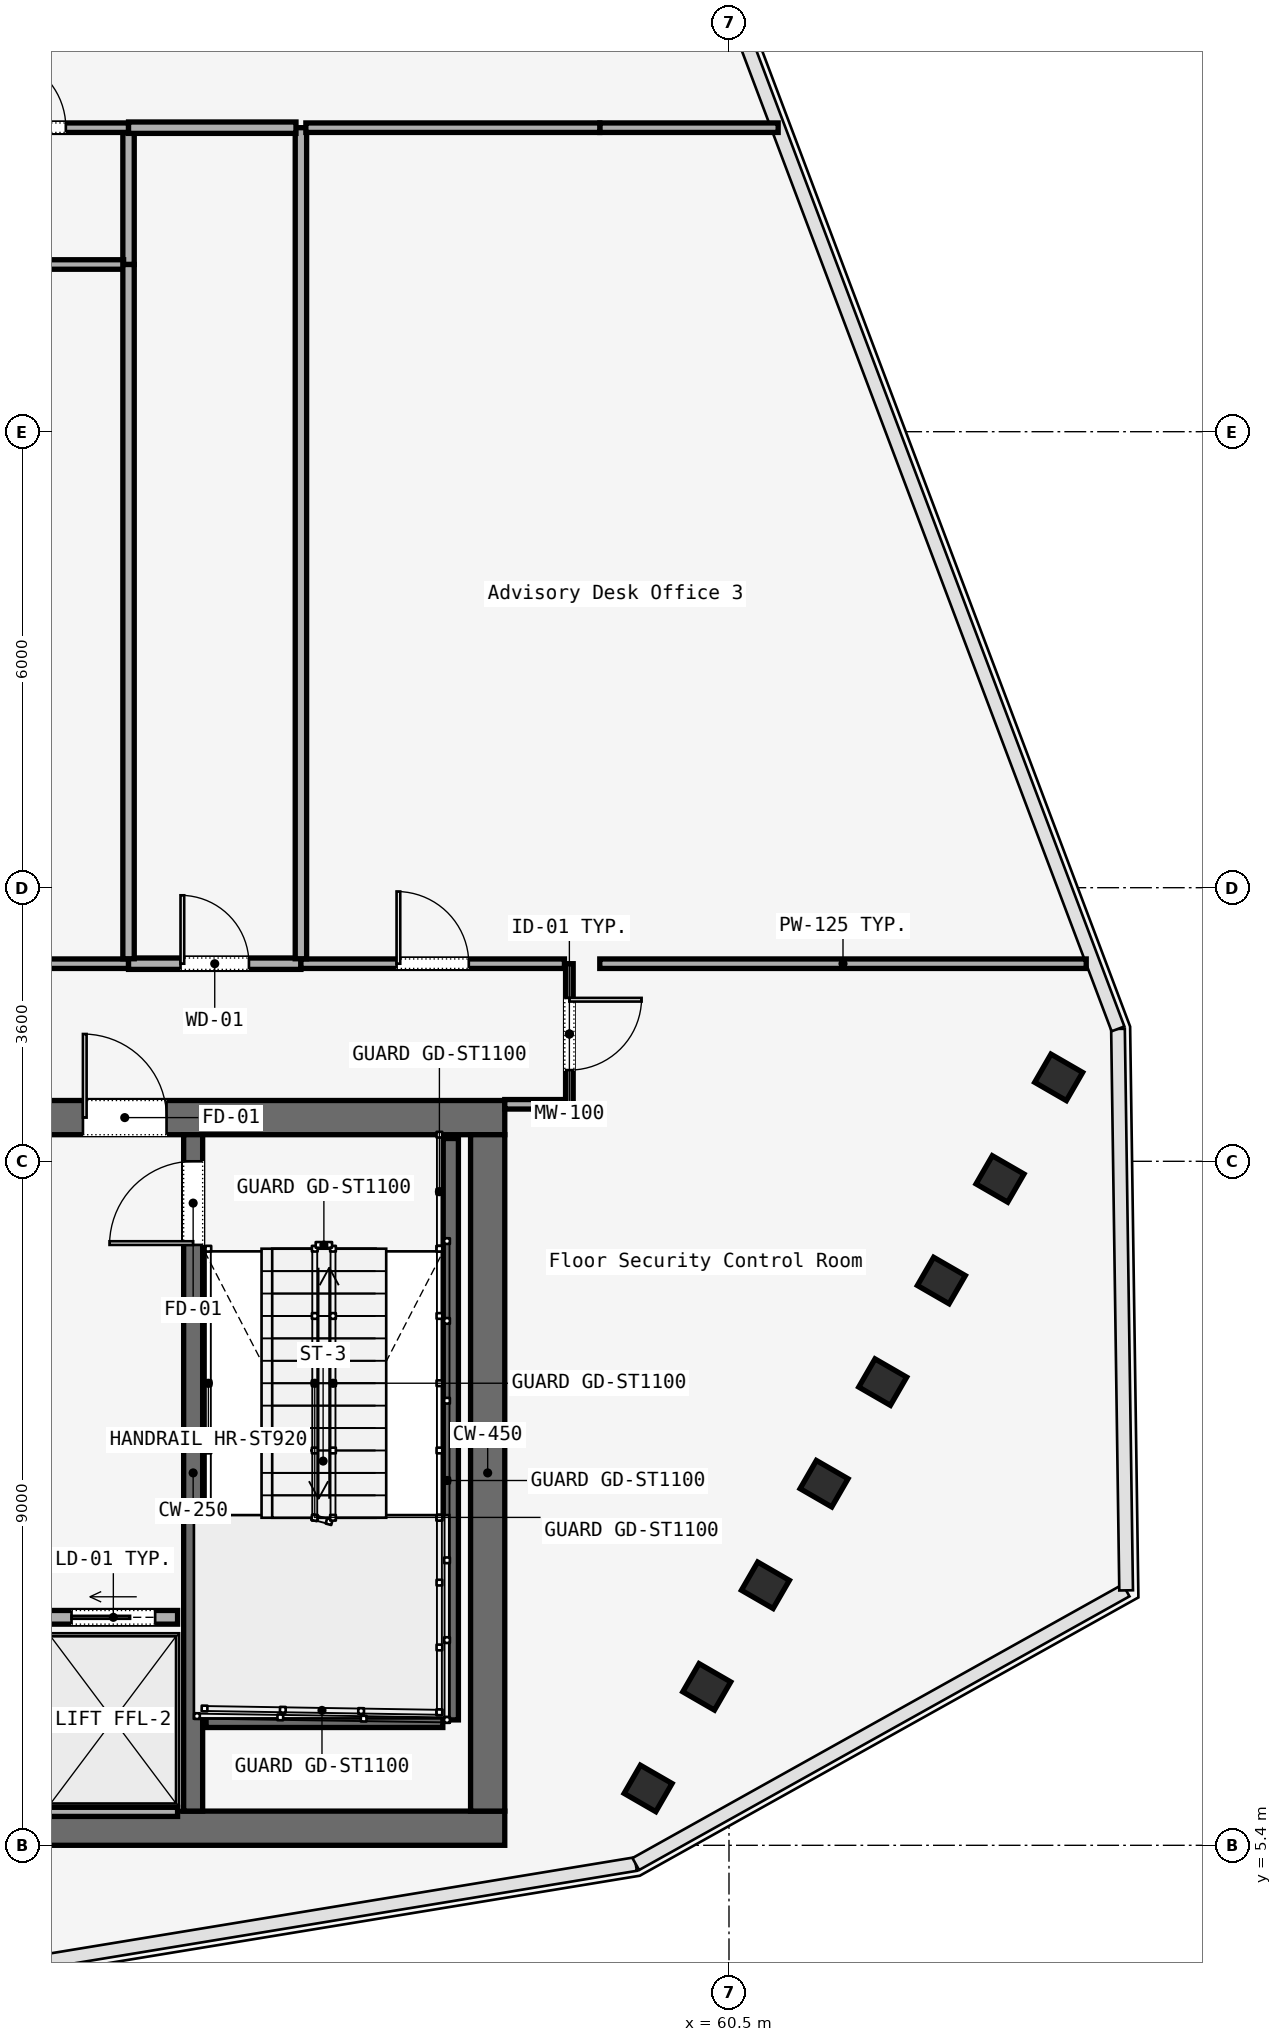
"""IFC4 building model, lengths in metres.
Left out: names, types, materials, properties, quantities, classifications, styles, units other than length and angle.
Written with IfcOpenShell. Run it as: python <this file> out.ifc"""

import sys

from ifc_helpers import new_model, si_unit, direction, frame, frame_2d, origin, origin_2d, place, context, subcontext, project, spatial, rectangle, i_section, extrude, element, fill, save


model = new_model("IFC4")
c1 = context("Model", 3, precision=1e-05, world=origin(), true_north=direction((0.0, 1.0)))
c2 = subcontext(c1, "Body", "Model", "MODEL_VIEW")
j1 = project(units=[si_unit("LENGTHUNIT", "METRE"), si_unit("PLANEANGLEUNIT", "RADIAN")], contexts=[c1])
p1 = place(None, origin())
s1 = spatial("IfcSite", under=j1, at=p1, CompositionType="ELEMENT")
p2 = place(p1, origin())
s2 = spatial("IfcBuilding", under=s1, at=p2, CompositionType="ELEMENT")
p3 = place(p2, frame((0.0, 0.0, 117.4)))
s3 = spatial("IfcBuildingStorey", under=s2, at=p3, CompositionType="ELEMENT", Elevation=117.4)
p4 = place(p3, frame((26.45, 14.975, 0.0), z_axis=(0.0, 0.0, 1.0), x_axis=(1.0, 0.0, 0.0)))
e1 = element("IfcWall", 1, at=p4, inside=s3, PredefinedType="SOLIDWALL", context=c2, shape_type="SweptSolid", body=[
    extrude(rectangle(XDim=31.1, YDim=0.45, at=frame_2d((15.55, 0.0))), origin(), (0.0, 0.0, 1.0), 4.52),
])
p5 = place(p4, frame((1.65, 0.0, 0.0)))
e2 = element("IfcOpeningElement", 2, at=p5, cuts=e1, PredefinedType="OPENING", context=c2, shape_type="SweptSolid", body=[
    extrude(rectangle(XDim=1.1, YDim=2.2, at=frame_2d((0.55, 1.1))), frame((0.0, 0.225, 0.0), z_axis=(0.0, -1.0, 0.0), x_axis=(1.0, 0.0, 0.0)), (0.0, 0.0, 1.0), 0.45),
])
p6 = place(p4, frame((13.65, 0.0, 0.0)))
e3 = element("IfcOpeningElement", 3, at=p6, cuts=e1, PredefinedType="OPENING", context=c2, shape_type="SweptSolid", body=[
    extrude(rectangle(XDim=1.1, YDim=2.2, at=frame_2d((0.55, 1.1))), frame((0.0, 0.225, 0.0), z_axis=(0.0, -1.0, 0.0), x_axis=(1.0, 0.0, 0.0)), (0.0, 0.0, 1.0), 0.45),
])
p7 = place(p4, frame((25.55, 0.0, 0.0)))
e4 = element("IfcOpeningElement", 4, at=p7, cuts=e1, PredefinedType="OPENING", context=c2, shape_type="SweptSolid", body=[
    extrude(rectangle(XDim=1.1, YDim=2.2, at=frame_2d((0.55, 1.1))), frame((0.0, 0.225, 0.0), z_axis=(0.0, -1.0, 0.0), x_axis=(1.0, 0.0, 0.0)), (0.0, 0.0, 1.0), 0.45),
])
p8 = place(p4, frame((10.7, 0.0, 0.0)))
e5 = element("IfcOpeningElement", 5, at=p8, cuts=e1, PredefinedType="OPENING", context=c2, shape_type="SweptSolid", body=[
    extrude(rectangle(XDim=1.4, YDim=2.2, at=frame_2d((0.7, 1.1))), frame((0.0, 0.225, 0.0), z_axis=(0.0, -1.0, 0.0), x_axis=(1.0, 0.0, 0.0)), (0.0, 0.0, 1.0), 0.45),
])
p9 = place(p4, frame((19.35, 0.0, 0.0)))
e6 = element("IfcOpeningElement", 6, at=p9, cuts=e1, PredefinedType="OPENING", context=c2, shape_type="SweptSolid", body=[
    extrude(rectangle(XDim=1.1, YDim=2.2, at=frame_2d((0.55, 1.1))), frame((0.0, 0.225, 0.0), z_axis=(0.0, -1.0, 0.0), x_axis=(1.0, 0.0, 0.0)), (0.0, 0.0, 1.0), 0.45),
])
p10 = place(p4, frame((21.4, 0.0, 0.0)))
e7 = element("IfcOpeningElement", 7, at=p10, cuts=e1, PredefinedType="OPENING", context=c2, shape_type="SweptSolid", body=[
    extrude(rectangle(XDim=0.9, YDim=2.1, at=frame_2d((0.45, 1.05))), frame((0.0, 0.225, 0.0), z_axis=(0.0, -1.0, 0.0), x_axis=(1.0, 0.0, 0.0)), (0.0, 0.0, 1.0), 0.45),
])
p11 = place(p4, frame((23.35, 0.0, 0.0)))
e8 = element("IfcOpeningElement", 8, at=p11, cuts=e1, PredefinedType="OPENING", context=c2, shape_type="SweptSolid", body=[
    extrude(rectangle(XDim=1.3, YDim=2.3, at=frame_2d((0.65, 1.15))), frame((0.0, 0.225, 0.0), z_axis=(0.0, -1.0, 0.0), x_axis=(1.0, 0.0, 0.0)), (0.0, 0.0, 1.0), 0.45),
])
p12 = place(p3, frame((26.45, 5.625, 0.0), z_axis=(0.0, 0.0, 1.0), x_axis=(1.0, 0.0, 0.0)))
e9 = element("IfcWall", 9, at=p12, inside=s3, PredefinedType="SOLIDWALL", context=c2, shape_type="SweptSolid", body=[
    extrude(rectangle(XDim=31.1, YDim=0.45, at=frame_2d((15.55, 0.0))), origin(), (0.0, 0.0, 1.0), 4.52),
])
p13 = place(p3, frame((57.325, 5.85, 0.0), z_axis=(0.0, 0.0, 1.0), x_axis=(0.0, 1.0, 0.0)))
e10 = element("IfcWall", 10, at=p13, inside=s3, PredefinedType="SOLIDWALL", context=c2, shape_type="SweptSolid", body=[
    extrude(rectangle(XDim=8.9, YDim=0.45, at=frame_2d((4.45, 0.0))), origin(), (0.0, 0.0, 1.0), 4.52),
])
p14 = place(p3, frame((53.45, 5.85, 0.0), z_axis=(0.0, 0.0, 1.0), x_axis=(0.0, 1.0, 0.0)))
e11 = element("IfcWall", 11, at=p14, inside=s3, PredefinedType="SOLIDWALL", context=c2, shape_type="SweptSolid", body=[
    extrude(rectangle(XDim=8.9, YDim=0.25, at=frame_2d((4.45, 0.0))), origin(), (0.0, 0.0, 1.0), 4.52),
])
p15 = place(p14, frame((7.45, 0.0, 0.0)))
e12 = element("IfcOpeningElement", 12, at=p15, cuts=e11, PredefinedType="OPENING", context=c2, shape_type="SweptSolid", body=[
    extrude(rectangle(XDim=1.1, YDim=2.2, at=frame_2d((0.55, 1.1))), frame((0.0, 0.125, 0.0), z_axis=(0.0, -1.0, 0.0), x_axis=(1.0, 0.0, 0.0)), (0.0, 0.0, 1.0), 0.25),
])
for number, where, z_axis, x_axis in (
    (13, (59.436, 6.148, 0.0), (0.0, 0.0, 1.0), (0.5, 0.866, 0.0)),
    (14, (60.208, 7.485, 0.0), (0.0, 0.0, 1.0), (0.5, 0.866, 0.0)),
    (15, (60.979, 8.821, 0.0), (0.0, 0.0, 1.0), (0.5, 0.866, 0.0)),
    (16, (61.751, 10.158, 0.0), (0.0, 0.0, 1.0), (0.5, 0.866, 0.0)),
    (17, (62.522, 11.495, 0.0), (0.0, 0.0, 1.0), (0.5, 0.866, 0.0)),
    (18, (63.294, 12.831, 0.0), (0.0, 0.0, 1.0), (0.5, 0.866, 0.0)),
    (19, (64.066, 14.168, 0.0), (0.0, 0.0, 1.0), (0.5, 0.866, 0.0)),
    (20, (64.837, 15.504, 0.0), (0.0, 0.0, 1.0), (0.5, 0.866, 0.0)),
):
    element("IfcColumn", number, at=place(p3, frame(where, z_axis=z_axis, x_axis=x_axis)), inside=s3, PredefinedType="COLUMN", context=c2, shape_type="SweptSolid", body=[
        extrude(i_section(OverallWidth=0.428, OverallDepth=0.481, WebThickness=0.051, FlangeThickness=0.065, FilletRadius=0.015, at=origin_2d()), origin(), (0.0, 0.0, 1.0), 4.52),
    ])
p16 = place(p3, frame((56.84, 14.7, 0.0), z_axis=(0.0, 0.0, 1.0), x_axis=(0.0, -1.0, 0.0)))
e21 = element("IfcWall", 21, at=p16, inside=s3, PredefinedType="SOLIDWALL", context=c2, shape_type="SweptSolid", body=[
    extrude(rectangle(XDim=7.65, YDim=0.2, at=frame_2d((3.825, 0.0))), origin(), (0.0, 0.0, 1.0), 4.8),
])
p17 = place(p3, frame((53.62, 7.05, 0.0), z_axis=(0.0, 0.0, 1.0), x_axis=(1.0, 0.0, 0.0)))
e22 = element("IfcWall", 22, at=p17, inside=s3, PredefinedType="SOLIDWALL", context=c2, shape_type="SweptSolid", body=[
    extrude(rectangle(XDim=3.115, YDim=0.2, at=frame_2d((1.558, 0.0))), origin(), (0.0, 0.0, 1.0), 4.8),
])
p18 = place(p3, frame((51.555, 8.4, 0.0), z_axis=(0.0, 0.0, 1.0), x_axis=(1.0, 0.0, 0.0)))
e23 = element("IfcWall", 23, at=p18, inside=s3, PredefinedType="SOLIDWALL", context=c2, shape_type="SweptSolid", body=[
    extrude(rectangle(XDim=1.69, YDim=0.18, at=frame_2d((0.845, 0.0))), origin(), (0.0, 0.0, 1.0), 3.39),
])
p19 = place(p18, frame((0.295, 0.0, 0.0)))
e24 = element("IfcOpeningElement", 24, at=p19, cuts=e23, PredefinedType="OPENING", context=c2, shape_type="SweptSolid", body=[
    extrude(rectangle(XDim=1.1, YDim=2.2, at=frame_2d((0.55, 1.1))), frame((0.0, 0.09, 0.0), z_axis=(0.0, -1.0, 0.0), x_axis=(1.0, 0.0, 0.0)), (0.0, 0.0, 1.0), 0.18),
])
p20 = place(p3, frame((51.555, 5.84, 0.0), z_axis=(0.0, 0.0, 1.0), x_axis=(1.0, 0.0, 0.0)))
e25 = element("IfcWall", 25, at=p20, inside=s3, PredefinedType="SOLIDWALL", context=c2, shape_type="SweptSolid", body=[
    extrude(rectangle(XDim=1.69, YDim=0.12, at=frame_2d((0.845, 0.0))), origin(), (0.0, 0.0, 1.0), 3.39),
])
p21 = place(p3, frame((58.4, 17.0, 0.0), z_axis=(0.0, 0.0, 1.0), x_axis=(0.0, -1.0, 0.0)))
e26 = element("IfcWall", 26, at=p21, inside=s3, PredefinedType="MOVABLE", context=c2, shape_type="SweptSolid", body=[
    extrude(rectangle(XDim=1.85, YDim=0.1, at=frame_2d((0.925, 0.0))), origin(), (0.0, 0.0, 1.0), 3.39),
])
p22 = place(p21, frame((0.45, 0.0, 0.0)))
e27 = element("IfcOpeningElement", 27, at=p22, cuts=e26, PredefinedType="OPENING", context=c2, shape_type="SweptSolid", body=[
    extrude(rectangle(XDim=0.95, YDim=2.2, at=frame_2d((0.475, 1.1))), frame((0.0, 0.05, 0.0), z_axis=(0.0, -1.0, 0.0), x_axis=(1.0, 0.0, 0.0)), (0.0, 0.0, 1.0), 0.1),
])
p23 = place(p3, frame((58.335, 15.15, 0.0), z_axis=(0.0, 0.0, 1.0), x_axis=(-1.0, 0.0, 0.0)))
e28 = element("IfcWall", 28, at=p23, inside=s3, PredefinedType="PARTITIONING", context=c2, shape_type="SweptSolid", body=[
    extrude(rectangle(XDim=0.785, YDim=0.125, at=frame_2d((0.393, 0.0))), origin(), (0.0, 0.0, 1.0), 3.39),
])
p24 = place(p3, frame((50.0, 28.0, 0.0), z_axis=(0.0, 0.0, 1.0), x_axis=(1.0, 0.0, 0.0)))
e29 = element("IfcWall", 29, at=p24, inside=s3, PredefinedType="PARTITIONING", context=c2, shape_type="SweptSolid", body=[
    extrude(rectangle(XDim=2.6, YDim=0.125, at=frame_2d((1.3, 0.0))), origin(), (0.0, 0.0, 1.0), 3.39),
])
p25 = place(p24, frame((0.825, 0.0, 0.0)))
e30 = element("IfcOpeningElement", 30, at=p25, cuts=e29, PredefinedType="OPENING", context=c2, shape_type="SweptSolid", body=[
    extrude(rectangle(XDim=0.95, YDim=2.2, at=frame_2d((0.475, 1.1))), frame((0.0, 0.062, 0.0), z_axis=(0.0, -1.0, 0.0), x_axis=(1.0, 0.0, 0.0)), (0.0, 0.0, 1.0), 0.125),
])
p26 = place(p3, frame((52.6, 27.935, 0.0), z_axis=(0.0, 0.0, 1.0), x_axis=(0.0, -1.0, 0.0)))
e31 = element("IfcWall", 31, at=p26, inside=s3, PredefinedType="PARTITIONING", context=c2, shape_type="SweptSolid", body=[
    extrude(rectangle(XDim=1.735, YDim=0.15, at=frame_2d((0.868, 0.0))), origin(), (0.0, 0.0, 1.0), 3.39),
])
p27 = place(p3, frame((52.535, 26.2, 0.0), z_axis=(0.0, 0.0, 1.0), x_axis=(-1.0, 0.0, 0.0)))
e32 = element("IfcWall", 32, at=p27, inside=s3, PredefinedType="PARTITIONING", context=c2, shape_type="SweptSolid", body=[
    extrude(rectangle(XDim=11.999, YDim=0.125, at=frame_2d((6.0, 0.0))), origin(), (0.0, 0.0, 1.0), 3.39),
])
p28 = place(p3, frame((40.536, 17.0, 0.0), z_axis=(0.0, 0.0, 1.0), x_axis=(1.0, 0.0, 0.0)))
e33 = element("IfcWall", 33, at=p28, inside=s3, PredefinedType="PARTITIONING", context=c2, shape_type="SweptSolid", body=[
    extrude(rectangle(XDim=12.064, YDim=0.125, at=frame_2d((6.032, 0.0))), origin(), (0.0, 0.0, 1.0), 3.39),
])
p29 = place(p28, frame((5.557, 0.0, 0.0)))
e34 = element("IfcOpeningElement", 34, at=p29, cuts=e33, PredefinedType="OPENING", context=c2, shape_type="SweptSolid", body=[
    extrude(rectangle(XDim=0.95, YDim=2.2, at=frame_2d((0.475, 1.1))), frame((0.0, 0.062, 0.0), z_axis=(0.0, -1.0, 0.0), x_axis=(1.0, 0.0, 0.0)), (0.0, 0.0, 1.0), 0.125),
])
p30 = place(p3, frame((52.6, 17.0, 0.0), z_axis=(0.0, 0.0, 1.0), x_axis=(1.0, 0.0, 0.0)))
e35 = element("IfcWall", 35, at=p30, inside=s3, PredefinedType="PARTITIONING", context=c2, shape_type="SweptSolid", body=[
    extrude(rectangle(XDim=2.268, YDim=0.15, at=frame_2d((1.134, 0.0))), origin(), (0.0, 0.0, 1.0), 3.39),
])
p31 = place(p30, frame((0.684, 0.0, 0.0)))
e36 = element("IfcOpeningElement", 36, at=p31, cuts=e35, PredefinedType="OPENING", context=c2, shape_type="SweptSolid", body=[
    extrude(rectangle(XDim=0.9, YDim=2.15, at=frame_2d((0.45, 1.075))), frame((0.0, 0.075, 0.0), z_axis=(0.0, -1.0, 0.0), x_axis=(1.0, 0.0, 0.0)), (0.0, 0.0, 1.0), 0.15),
])
p32 = place(p3, frame((54.868, 17.0, 0.0), z_axis=(0.0, 0.0, 1.0), x_axis=(1.0, 0.0, 0.0)))
e37 = element("IfcWall", 37, at=p32, inside=s3, PredefinedType="PARTITIONING", context=c2, shape_type="SweptSolid", body=[
    extrude(rectangle(XDim=3.467, YDim=0.125, at=frame_2d((1.733, 0.0))), origin(), (0.0, 0.0, 1.0), 3.39),
])
p33 = place(p32, frame((1.259, 0.0, 0.0)))
e38 = element("IfcOpeningElement", 38, at=p33, cuts=e37, PredefinedType="OPENING", context=c2, shape_type="SweptSolid", body=[
    extrude(rectangle(XDim=0.95, YDim=2.2, at=frame_2d((0.475, 1.1))), frame((0.0, 0.062, 0.0), z_axis=(0.0, -1.0, 0.0), x_axis=(1.0, 0.0, 0.0)), (0.0, 0.0, 1.0), 0.125),
])
p34 = place(p3, frame((58.8, 17.0, 0.0), z_axis=(0.0, 0.0, 1.0), x_axis=(1.0, 0.0, 0.0)))
e39 = element("IfcWall", 39, at=p34, inside=s3, PredefinedType="PARTITIONING", context=c2, shape_type="SweptSolid", body=[
    extrude(rectangle(XDim=6.4, YDim=0.125, at=frame_2d((3.2, 0.0))), origin(), (0.0, 0.0, 1.0), 3.39),
])
p35 = place(p3, frame((52.6, 26.2, 0.0), z_axis=(0.0, 0.0, 1.0), x_axis=(0.0, -1.0, 0.0)))
e40 = element("IfcWall", 40, at=p35, inside=s3, PredefinedType="PARTITIONING", context=c2, shape_type="SweptSolid", body=[
    extrude(rectangle(XDim=9.135, YDim=0.15, at=frame_2d((4.567, 0.0))), origin(), (0.0, 0.0, 1.0), 3.39),
])
p36 = place(p3, frame((58.8, 28.0, 0.0), z_axis=(0.0, 0.0, 1.0), x_axis=(1.0, 0.0, 0.0)))
e41 = element("IfcWall", 41, at=p36, inside=s3, PredefinedType="PARTITIONING", context=c2, shape_type="SweptSolid", body=[
    extrude(rectangle(XDim=2.347, YDim=0.125, at=frame_2d((1.173, 0.0))), origin(), (0.0, 0.0, 1.0), 3.39),
])
p37 = place(p3, frame((54.868, 17.065, 0.0), z_axis=(0.0, 0.0, 1.0), x_axis=(0.0, 1.0, 0.0)))
e42 = element("IfcWall", 42, at=p37, inside=s3, PredefinedType="PARTITIONING", context=c2, shape_type="SweptSolid", body=[
    extrude(rectangle(XDim=10.935, YDim=0.15, at=frame_2d((5.468, 0.0))), origin(), (0.0, 0.0, 1.0), 3.39),
])
p38 = place(p3, frame((54.933, 28.0, 0.0), z_axis=(0.0, 0.0, 1.0), x_axis=(1.0, 0.0, 0.0)))
e43 = element("IfcWall", 43, at=p38, inside=s3, PredefinedType="PARTITIONING", context=c2, shape_type="SweptSolid", body=[
    extrude(rectangle(XDim=3.867, YDim=0.125, at=frame_2d((1.934, 0.0))), origin(), (0.0, 0.0, 1.0), 3.39),
])
p39 = place(p3, frame((52.6, 28.0, 0.0), z_axis=(0.0, 0.0, 1.0), x_axis=(1.0, 0.0, 0.0)))
e44 = element("IfcWall", 44, at=p39, inside=s3, PredefinedType="PARTITIONING", context=c2, shape_type="SweptSolid", body=[
    extrude(rectangle(XDim=2.203, YDim=0.15, at=frame_2d((1.102, 0.0))), origin(), (0.0, 0.0, 1.0), 3.39),
])
p40 = place(p7, origin())
e45 = element("IfcDoor", 45, at=p40, inside=s3, OperationType="SINGLE_SWING_RIGHT", PredefinedType="DOOR", context=c2, shape_type="SweptSolid", body=[
    extrude(rectangle(XDim=1.1, YDim=2.2, at=frame_2d((0.55, 1.1))), frame((0.0, 0.025, 0.0), z_axis=(0.0, -1.0, 0.0), x_axis=(1.0, 0.0, 0.0)), (0.0, 0.0, 1.0), 0.05),
])
fill(e4, e45)
p41 = place(p15, origin())
e46 = element("IfcDoor", 46, at=p41, inside=s3, OperationType="SINGLE_SWING_LEFT", PredefinedType="DOOR", context=c2, shape_type="SweptSolid", body=[
    extrude(rectangle(XDim=1.1, YDim=2.2, at=frame_2d((0.55, 1.1))), frame((0.0, 0.025, 0.0), z_axis=(0.0, -1.0, 0.0), x_axis=(1.0, 0.0, 0.0)), (0.0, 0.0, 1.0), 0.05),
])
fill(e12, e46)
p42 = place(p19, origin())
e47 = element("IfcDoor", 47, at=p42, inside=s3, OperationType="SLIDING_TO_LEFT", PredefinedType="DOOR", context=c2, shape_type="SweptSolid", body=[
    extrude(rectangle(XDim=1.1, YDim=2.2, at=frame_2d((0.55, 1.1))), frame((0.0, 0.025, 0.0), z_axis=(0.0, -1.0, 0.0), x_axis=(1.0, 0.0, 0.0)), (0.0, 0.0, 1.0), 0.05),
])
fill(e24, e47)
p43 = place(p22, origin())
e48 = element("IfcDoor", 48, at=p43, inside=s3, OperationType="SINGLE_SWING_LEFT", PredefinedType="DOOR", context=c2, shape_type="SweptSolid", body=[
    extrude(rectangle(XDim=0.95, YDim=2.2, at=frame_2d((0.475, 1.1))), frame((0.0, 0.025, 0.0), z_axis=(0.0, -1.0, 0.0), x_axis=(1.0, 0.0, 0.0)), (0.0, 0.0, 1.0), 0.05),
])
fill(e27, e48)
p44 = place(p33, origin())
e49 = element("IfcDoor", 49, at=p44, inside=s3, OperationType="SINGLE_SWING_LEFT", PredefinedType="DOOR", context=c2, shape_type="SweptSolid", body=[
    extrude(rectangle(XDim=0.95, YDim=2.2, at=frame_2d((0.475, 1.1))), frame((0.0, 0.025, 0.0), z_axis=(0.0, -1.0, 0.0), x_axis=(1.0, 0.0, 0.0)), (0.0, 0.0, 1.0), 0.05),
])
fill(e38, e49)
p45 = place(p31, origin())
e50 = element("IfcDoor", 50, at=p45, inside=s3, OperationType="SINGLE_SWING_RIGHT", PredefinedType="DOOR", context=c2, shape_type="SweptSolid", body=[
    extrude(rectangle(XDim=0.9, YDim=2.15, at=frame_2d((0.45, 1.075))), frame((0.0, 0.025, 0.0), z_axis=(0.0, -1.0, 0.0), x_axis=(1.0, 0.0, 0.0)), (0.0, 0.0, 1.0), 0.05),
])
fill(e36, e50)
p46 = place(p25, origin())
e51 = element("IfcDoor", 51, at=p46, inside=s3, OperationType="SINGLE_SWING_RIGHT", PredefinedType="DOOR", context=c2, shape_type="SweptSolid", body=[
    extrude(rectangle(XDim=0.95, YDim=2.2, at=frame_2d((0.475, 1.1))), frame((0.0, 0.025, 0.0), z_axis=(0.0, -1.0, 0.0), x_axis=(1.0, 0.0, 0.0)), (0.0, 0.0, 1.0), 0.05),
])
fill(e30, e51)
save(model, sys.argv[1])
